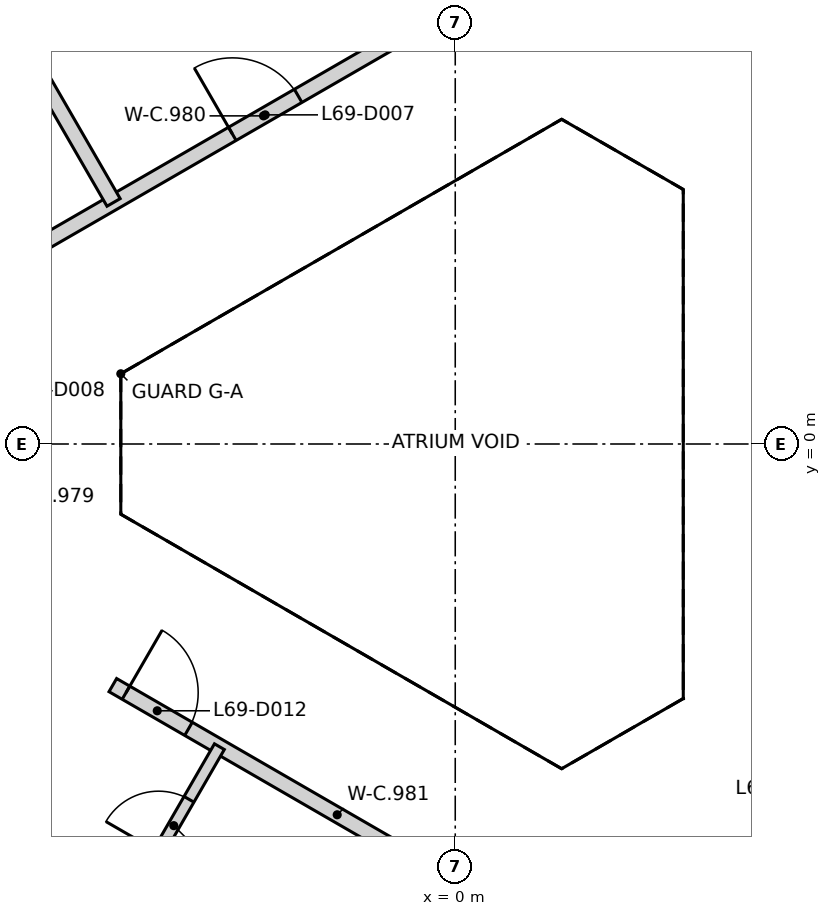
"""IFC4 building model, lengths in metres.
Left out: names, types, materials, properties, quantities, classifications, styles, units other than length and angle.
Written with IfcOpenShell. Run it as: python <this file> out.ifc"""

import sys

from ifc_helpers import new_model, si_unit, direction, frame, frame_2d, origin, place, context, subcontext, project, spatial, rectangle, extrude, element, fill, save


model = new_model("IFC4")
c1 = context("Model", 3, precision=1e-05, world=origin(), true_north=direction((0.0, 1.0)))
c2 = subcontext(c1, "Body", "Model", "MODEL_VIEW")
j1 = project(units=[si_unit("LENGTHUNIT", "METRE"), si_unit("PLANEANGLEUNIT", "RADIAN")], contexts=[c1])
p1 = place(None, origin())
s1 = spatial("IfcSite", under=j1, at=p1, CompositionType="ELEMENT")
p2 = place(p1, origin())
s2 = spatial("IfcBuilding", under=s1, at=p2, CompositionType="ELEMENT")
p3 = place(p2, frame((0.0, 0.0, 273.0)))
s3 = spatial("IfcBuildingStorey", under=s2, at=p3, CompositionType="ELEMENT", Elevation=273.0)
p4 = place(p3, frame((-6.4, 2.079, 0.0), z_axis=(0.0, 0.0, 1.0), x_axis=(0.866044821263, 0.499966366432, 0.0)))
e1 = element("IfcWall", 1, at=p4, inside=s3, PredefinedType="PARTITIONING", context=c2, shape_type="SweptSolid", body=[
    extrude(rectangle(XDim=8.953, YDim=0.2, at=frame_2d((4.477, 0.0))), origin(), (0.0, 0.0, 1.0), 3.25),
])
p5 = place(p4, frame((4.003, 0.0, 0.0)))
e2 = element("IfcOpeningElement", 2, at=p5, cuts=e1, PredefinedType="OPENING", context=c2, shape_type="SweptSolid", body=[
    extrude(rectangle(XDim=1.0, YDim=2.1, at=frame_2d((0.5, 1.05))), frame((0.0, 0.11, 0.0), z_axis=(0.0, -1.0, 0.0), x_axis=(1.0, 0.0, 0.0)), (0.0, 0.0, 1.0), 0.22),
])
p6 = place(p3, frame((-4.505, -3.172, 0.0), z_axis=(0.0, 0.0, 1.0), x_axis=(0.865815783666, -0.500362897061, 0.0)))
e3 = element("IfcWall", 3, at=p6, inside=s3, PredefinedType="PARTITIONING", context=c2, shape_type="SweptSolid", body=[
    extrude(rectangle(XDim=6.819, YDim=0.2, at=frame_2d((3.409, 0.0))), origin(), (0.0, 0.0, 1.0), 3.25),
])
p7 = place(p6, frame((0.2, 0.0, 0.0)))
e4 = element("IfcOpeningElement", 4, at=p7, cuts=e3, PredefinedType="OPENING", context=c2, shape_type="SweptSolid", body=[
    extrude(rectangle(XDim=0.95, YDim=2.1, at=frame_2d((0.475, 1.05))), frame((0.0, 0.11, 0.0), z_axis=(0.0, -1.0, 0.0), x_axis=(1.0, 0.0, 0.0)), (0.0, 0.0, 1.0), 0.22),
])
p8 = place(p3, frame((-11.035, 14.505, 0.0), z_axis=(0.0, 0.0, 1.0), x_axis=(0.499989597041, -0.866031409852, 0.0)))
e5 = element("IfcWall", 5, at=p8, inside=s3, PredefinedType="PARTITIONING", context=c2, shape_type="SweptSolid", body=[
    extrude(rectangle(XDim=13.079, YDim=0.2, at=frame_2d((6.54, 0.0))), origin(), (0.0, 0.0, 1.0), 3.25),
])
p9 = place(p3, frame((-4.303, -6.06, 0.0), z_axis=(0.0, 0.0, 1.0), x_axis=(0.500045362686, 0.865999212041, 0.0)))
e6 = element("IfcWall", 6, at=p9, inside=s3, PredefinedType="PARTITIONING", context=c2, shape_type="SweptSolid", body=[
    extrude(rectangle(XDim=2.4, YDim=0.15, at=frame_2d((1.2, 0.0))), origin(), (0.0, 0.0, 1.0), 3.25),
])
p10 = place(p9, frame((0.8, 0.0, 0.0)))
e7 = element("IfcOpeningElement", 7, at=p10, cuts=e6, PredefinedType="OPENING", context=c2, shape_type="SweptSolid", body=[
    extrude(rectangle(XDim=0.8, YDim=2.1, at=frame_2d((0.4, 1.05))), frame((0.0, 0.085, 0.0), z_axis=(0.0, -1.0, 0.0), x_axis=(1.0, 0.0, 0.0)), (0.0, 0.0, 1.0), 0.17),
])
p11 = place(p5, origin())
e8 = element("IfcDoor", 8, at=p11, inside=s3, OperationType="SINGLE_SWING_LEFT", PredefinedType="DOOR", context=c2, shape_type="SweptSolid", body=[
    extrude(rectangle(XDim=1.0, YDim=2.1, at=frame_2d((0.5, 1.05))), frame((0.0, 0.025, 0.0), z_axis=(0.0, -1.0, 0.0), x_axis=(1.0, 0.0, 0.0)), (0.0, 0.0, 1.0), 0.05),
])
fill(e2, e8)
p12 = place(p7, frame((0.95, 0.0, 0.0), z_axis=(0.0, 0.0, 1.0), x_axis=(-1.0, 0.0, 0.0)))
e9 = element("IfcDoor", 9, at=p12, inside=s3, OperationType="SINGLE_SWING_LEFT", PredefinedType="DOOR", context=c2, shape_type="SweptSolid", body=[
    extrude(rectangle(XDim=0.95, YDim=2.1, at=frame_2d((0.475, 1.05))), frame((0.0, 0.025, 0.0), z_axis=(0.0, -1.0, 0.0), x_axis=(1.0, 0.0, 0.0)), (0.0, 0.0, 1.0), 0.05),
])
fill(e4, e9)
p13 = place(p10, frame((0.8, 0.0, 0.0), z_axis=(0.0, 0.0, 1.0), x_axis=(-1.0, 0.0, 0.0)))
e10 = element("IfcDoor", 10, at=p13, inside=s3, OperationType="SINGLE_SWING_LEFT", PredefinedType="DOOR", context=c2, shape_type="SweptSolid", body=[
    extrude(rectangle(XDim=0.8, YDim=2.1, at=frame_2d((0.4, 1.05))), frame((0.0, 0.025, 0.0), z_axis=(0.0, -1.0, 0.0), x_axis=(1.0, 0.0, 0.0)), (0.0, 0.0, 1.0), 0.05),
])
fill(e7, e10)
save(model, sys.argv[1])
